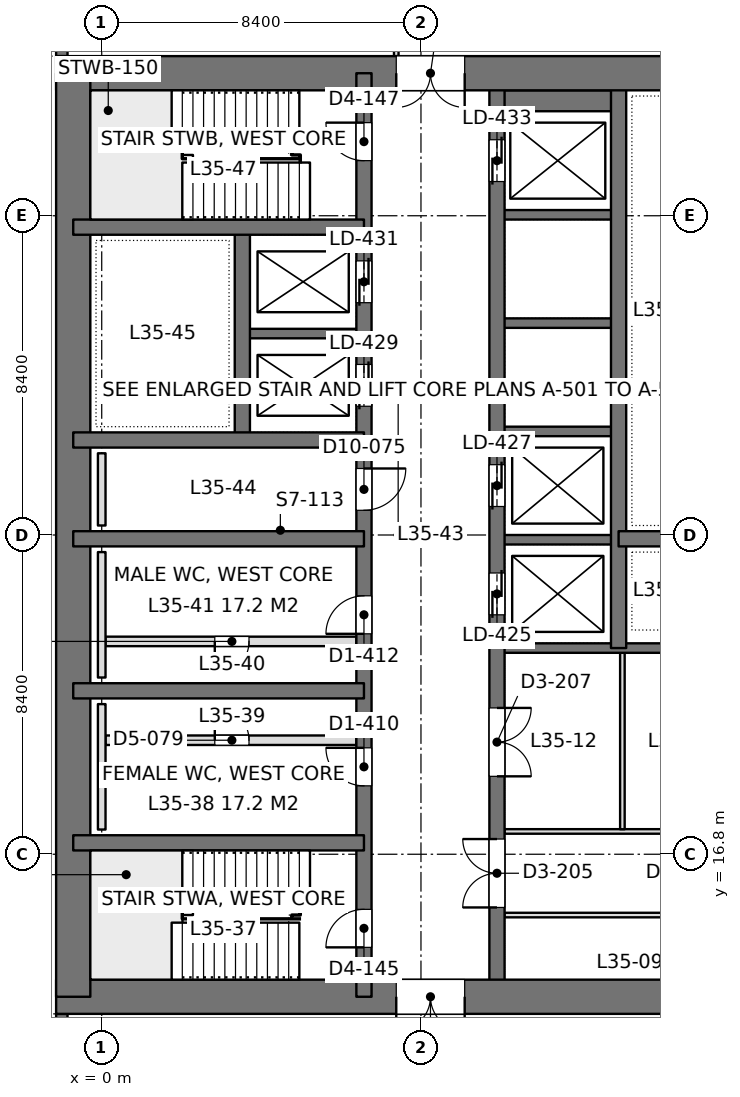
"""IFC4 building model, lengths in metres.
Left out: names, types, materials, properties, quantities, classifications, styles, units other than length and angle.
Written with IfcOpenShell. Run it as: python <this file> out.ifc"""

import sys

from ifc_helpers import new_model, si_unit, direction, frame, frame_2d, origin, place, context, subcontext, project, spatial, rectangle, extrude, element, fill, save


model = new_model("IFC4")
c1 = context("Model", 3, precision=1e-05, world=origin(), true_north=direction((0.0, 1.0)))
c2 = subcontext(c1, "Body", "Model", "MODEL_VIEW")
j1 = project(units=[si_unit("LENGTHUNIT", "METRE"), si_unit("PLANEANGLEUNIT", "RADIAN")], contexts=[c1])
p1 = place(None, origin())
s1 = spatial("IfcSite", under=j1, at=p1, CompositionType="ELEMENT")
p2 = place(p1, origin())
s2 = spatial("IfcBuilding", under=s1, at=p2, CompositionType="ELEMENT")
p3 = place(p2, frame((0.0, 0.0, 155.4)))
s3 = spatial("IfcBuildingStorey", under=s2, at=p3, CompositionType="ELEMENT", Elevation=155.4)
p4 = place(p3, frame((-1.2, 13.05, 0.0), z_axis=(0.0, 0.0, 1.0), x_axis=(1.0, 0.0, 0.0)))
e1 = element("IfcWall", 1, at=p4, inside=s3, PredefinedType="SHEAR", context=c2, shape_type="SweptSolid", body=[
    extrude(rectangle(XDim=18.0, YDim=0.9, at=frame_2d((9.0, 0.0))), origin(), (0.0, 0.0, 1.0), 4.2),
])
p5 = place(p4, frame((8.95, 0.0, 0.0)))
e2 = element("IfcOpeningElement", 2, at=p5, cuts=e1, PredefinedType="OPENING", context=c2, shape_type="SweptSolid", body=[
    extrude(rectangle(XDim=1.8, YDim=2.4, at=frame_2d((0.9, 1.2))), frame((0.0, 0.46, 0.0), z_axis=(0.0, -1.0, 0.0), x_axis=(1.0, 0.0, 0.0)), (0.0, 0.0, 1.0), 0.92),
])
p6 = place(p3, frame((-1.2, 37.35, 0.0), z_axis=(0.0, 0.0, 1.0), x_axis=(1.0, 0.0, 0.0)))
e3 = element("IfcWall", 3, at=p6, inside=s3, PredefinedType="SHEAR", context=c2, shape_type="SweptSolid", body=[
    extrude(rectangle(XDim=18.0, YDim=0.9, at=frame_2d((9.0, 0.0))), origin(), (0.0, 0.0, 1.0), 4.2),
])
p7 = place(p6, frame((8.95, 0.0, 0.0)))
e4 = element("IfcOpeningElement", 4, at=p7, cuts=e3, PredefinedType="OPENING", context=c2, shape_type="SweptSolid", body=[
    extrude(rectangle(XDim=1.8, YDim=2.4, at=frame_2d((0.9, 1.2))), frame((0.0, 0.46, 0.0), z_axis=(0.0, -1.0, 0.0), x_axis=(1.0, 0.0, 0.0)), (0.0, 0.0, 1.0), 0.92),
])
p8 = place(p3, frame((-0.75, 13.05, 0.0), z_axis=(0.0, 0.0, 1.0), x_axis=(0.0, 1.0, 0.0)))
e5 = element("IfcWall", 5, at=p8, inside=s3, PredefinedType="SHEAR", context=c2, shape_type="SweptSolid", body=[
    extrude(rectangle(XDim=24.3, YDim=0.9, at=frame_2d((12.15, 0.0))), origin(), (0.0, 0.0, 1.0), 4.2),
])
p9 = place(p3, frame((6.9, 13.05, 0.0), z_axis=(0.0, 0.0, 1.0), x_axis=(0.0, 1.0, 0.0)))
e6 = element("IfcWall", 6, at=p9, inside=s3, PredefinedType="SHEAR", context=c2, shape_type="SweptSolid", body=[
    extrude(rectangle(XDim=24.3, YDim=0.4, at=frame_2d((12.15, 0.0))), origin(), (0.0, 0.0, 1.0), 4.2),
])
p10 = place(p9, frame((1.3, 0.0, 0.0)))
e7 = element("IfcOpeningElement", 7, at=p10, cuts=e6, PredefinedType="OPENING", context=c2, shape_type="SweptSolid", body=[
    extrude(rectangle(XDim=1.0, YDim=2.2, at=frame_2d((0.5, 1.1))), frame((0.0, 0.21, 0.0), z_axis=(0.0, -1.0, 0.0), x_axis=(1.0, 0.0, 0.0)), (0.0, 0.0, 1.0), 0.42),
])
p11 = place(p9, frame((22.0, 0.0, 0.0)))
e8 = element("IfcOpeningElement", 8, at=p11, cuts=e6, PredefinedType="OPENING", context=c2, shape_type="SweptSolid", body=[
    extrude(rectangle(XDim=1.0, YDim=2.2, at=frame_2d((0.5, 1.1))), frame((0.0, 0.21, 0.0), z_axis=(0.0, -1.0, 0.0), x_axis=(1.0, 0.0, 0.0)), (0.0, 0.0, 1.0), 0.42),
])
p12 = place(p9, frame((5.55, 0.0, 0.0)))
e9 = element("IfcOpeningElement", 9, at=p12, cuts=e6, PredefinedType="OPENING", context=c2, shape_type="SweptSolid", body=[
    extrude(rectangle(XDim=1.0, YDim=2.2, at=frame_2d((0.5, 1.1))), frame((0.0, 0.21, 0.0), z_axis=(0.0, -1.0, 0.0), x_axis=(1.0, 0.0, 0.0)), (0.0, 0.0, 1.0), 0.42),
])
p13 = place(p9, frame((9.55, 0.0, 0.0)))
e10 = element("IfcOpeningElement", 10, at=p13, cuts=e6, PredefinedType="OPENING", context=c2, shape_type="SweptSolid", body=[
    extrude(rectangle(XDim=1.0, YDim=2.2, at=frame_2d((0.5, 1.1))), frame((0.0, 0.21, 0.0), z_axis=(0.0, -1.0, 0.0), x_axis=(1.0, 0.0, 0.0)), (0.0, 0.0, 1.0), 0.42),
])
p14 = place(p9, frame((12.8, 0.0, 0.0)))
e11 = element("IfcOpeningElement", 11, at=p14, cuts=e6, PredefinedType="OPENING", context=c2, shape_type="SweptSolid", body=[
    extrude(rectangle(XDim=1.1, YDim=2.2, at=frame_2d((0.55, 1.1))), frame((0.0, 0.21, 0.0), z_axis=(0.0, -1.0, 0.0), x_axis=(1.0, 0.0, 0.0)), (0.0, 0.0, 1.0), 0.42),
])
p15 = place(p9, frame((15.538, 0.0, 0.0)))
e12 = element("IfcOpeningElement", 12, at=p15, cuts=e6, PredefinedType="OPENING", context=c2, shape_type="SweptSolid", body=[
    extrude(rectangle(XDim=1.1, YDim=2.2, at=frame_2d((0.55, 1.1))), frame((0.0, 0.21, 0.0), z_axis=(0.0, -1.0, 0.0), x_axis=(1.0, 0.0, 0.0)), (0.0, 0.0, 1.0), 0.42),
])
p16 = place(p9, frame((18.262, 0.0, 0.0)))
e13 = element("IfcOpeningElement", 13, at=p16, cuts=e6, PredefinedType="OPENING", context=c2, shape_type="SweptSolid", body=[
    extrude(rectangle(XDim=1.1, YDim=2.2, at=frame_2d((0.55, 1.1))), frame((0.0, 0.21, 0.0), z_axis=(0.0, -1.0, 0.0), x_axis=(1.0, 0.0, 0.0)), (0.0, 0.0, 1.0), 0.42),
])
p17 = place(p3, frame((10.4, 13.05, 0.0), z_axis=(0.0, 0.0, 1.0), x_axis=(0.0, 1.0, 0.0)))
e14 = element("IfcWall", 14, at=p17, inside=s3, PredefinedType="SHEAR", context=c2, shape_type="SweptSolid", body=[
    extrude(rectangle(XDim=24.3, YDim=0.4, at=frame_2d((12.15, 0.0))), origin(), (0.0, 0.0, 1.0), 4.2),
])
p18 = place(p17, frame((10.05, 0.0, 0.0)))
e15 = element("IfcOpeningElement", 15, at=p18, cuts=e14, PredefinedType="OPENING", context=c2, shape_type="SweptSolid", body=[
    extrude(rectangle(XDim=1.1, YDim=2.2, at=frame_2d((0.55, 1.1))), frame((0.0, 0.21, 0.0), z_axis=(0.0, -1.0, 0.0), x_axis=(1.0, 0.0, 0.0)), (0.0, 0.0, 1.0), 0.42),
])
p19 = place(p17, frame((12.9, 0.0, 0.0)))
e16 = element("IfcOpeningElement", 16, at=p19, cuts=e14, PredefinedType="OPENING", context=c2, shape_type="SweptSolid", body=[
    extrude(rectangle(XDim=1.1, YDim=2.2, at=frame_2d((0.55, 1.1))), frame((0.0, 0.21, 0.0), z_axis=(0.0, -1.0, 0.0), x_axis=(1.0, 0.0, 0.0)), (0.0, 0.0, 1.0), 0.42),
])
p20 = place(p17, frame((21.45, 0.0, 0.0)))
e17 = element("IfcOpeningElement", 17, at=p20, cuts=e14, PredefinedType="OPENING", context=c2, shape_type="SweptSolid", body=[
    extrude(rectangle(XDim=1.1, YDim=2.2, at=frame_2d((0.55, 1.1))), frame((0.0, 0.21, 0.0), z_axis=(0.0, -1.0, 0.0), x_axis=(1.0, 0.0, 0.0)), (0.0, 0.0, 1.0), 0.42),
])
p21 = place(p17, frame((2.35, 0.0, 0.0)))
e18 = element("IfcOpeningElement", 18, at=p21, cuts=e14, PredefinedType="OPENING", context=c2, shape_type="SweptSolid", body=[
    extrude(rectangle(XDim=1.8, YDim=2.4, at=frame_2d((0.9, 1.2))), frame((0.0, 0.21, 0.0), z_axis=(0.0, -1.0, 0.0), x_axis=(1.0, 0.0, 0.0)), (0.0, 0.0, 1.0), 0.42),
])
p22 = place(p17, frame((5.8, 0.0, 0.0)))
e19 = element("IfcOpeningElement", 19, at=p22, cuts=e14, PredefinedType="OPENING", context=c2, shape_type="SweptSolid", body=[
    extrude(rectangle(XDim=1.8, YDim=2.4, at=frame_2d((0.9, 1.2))), frame((0.0, 0.21, 0.0), z_axis=(0.0, -1.0, 0.0), x_axis=(1.0, 0.0, 0.0)), (0.0, 0.0, 1.0), 0.42),
])
p23 = place(p3, frame((13.6, 22.225, 0.0), z_axis=(0.0, 0.0, 1.0), x_axis=(0.0, 1.0, 0.0)))
e20 = element("IfcWall", 20, at=p23, inside=s3, PredefinedType="SHEAR", context=c2, shape_type="SweptSolid", body=[
    extrude(rectangle(XDim=15.125, YDim=0.4, at=frame_2d((7.562, 0.0))), origin(), (0.0, 0.0, 1.0), 4.2),
])
for number, where, z_axis, x_axis in (
    (21, (-0.75, 17.1, 0.0), (0.0, 0.0, 1.0), (1.0, 0.0, 0.0)),
    (22, (-0.75, 21.1, 0.0), (0.0, 0.0, 1.0), (1.0, 0.0, 0.0)),
    (23, (-0.75, 25.1, 0.0), (0.0, 0.0, 1.0), (1.0, 0.0, 0.0)),
    (24, (-0.75, 27.7, 0.0), (0.0, 0.0, 1.0), (1.0, 0.0, 0.0)),
    (25, (-0.75, 33.3, 0.0), (0.0, 0.0, 1.0), (1.0, 0.0, 0.0)),
):
    element("IfcWall", number, at=place(p3, frame(where, z_axis=z_axis, x_axis=x_axis)), inside=s3, PredefinedType="SHEAR", context=c2, shape_type="SweptSolid", body=[
        extrude(rectangle(XDim=7.65, YDim=0.4, at=frame_2d((3.825, 0.0))), origin(), (0.0, 0.0, 1.0), 4.2),
    ])
p24 = place(p3, frame((3.7, 27.7, 0.0), z_axis=(0.0, 0.0, 1.0), x_axis=(0.0, 1.0, 0.0)))
e26 = element("IfcWall", 26, at=p24, inside=s3, PredefinedType="SHEAR", context=c2, shape_type="SweptSolid", body=[
    extrude(rectangle(XDim=5.6, YDim=0.4, at=frame_2d((2.8, 0.0))), origin(), (0.0, 0.0, 1.0), 4.2),
])
p25 = place(p3, frame((3.7, 30.5, 0.0), z_axis=(0.0, 0.0, 1.0), x_axis=(1.0, 0.0, 0.0)))
e27 = element("IfcWall", 27, at=p25, inside=s3, PredefinedType="SHEAR", context=c2, shape_type="SweptSolid", body=[
    extrude(rectangle(XDim=3.2, YDim=0.25, at=frame_2d((1.6, 0.0))), origin(), (0.0, 0.0, 1.0), 4.2),
])
p26 = place(p3, frame((13.6, 25.1, 0.0), z_axis=(0.0, 0.0, 1.0), x_axis=(1.0, 0.0, 0.0)))
e28 = element("IfcWall", 28, at=p26, inside=s3, PredefinedType="SHEAR", context=c2, shape_type="SweptSolid", body=[
    extrude(rectangle(XDim=2.75, YDim=0.4, at=frame_2d((1.375, 0.0))), origin(), (0.0, 0.0, 1.0), 4.2),
])
p27 = place(p3, frame((10.4, 22.225, 0.0), z_axis=(0.0, 0.0, 1.0), x_axis=(1.0, 0.0, 0.0)))
e29 = element("IfcWall", 29, at=p27, inside=s3, PredefinedType="SHEAR", context=c2, shape_type="SweptSolid", body=[
    extrude(rectangle(XDim=5.95, YDim=0.25, at=frame_2d((2.975, 0.0))), origin(), (0.0, 0.0, 1.0), 4.2),
])
for number, where, z_axis, x_axis in (
    (30, (10.4, 25.075, 0.0), (0.0, 0.0, 1.0), (1.0, 0.0, 0.0)),
    (31, (10.4, 27.925, 0.0), (0.0, 0.0, 1.0), (1.0, 0.0, 0.0)),
    (32, (10.4, 30.775, 0.0), (0.0, 0.0, 1.0), (1.0, 0.0, 0.0)),
    (33, (10.4, 33.625, 0.0), (0.0, 0.0, 1.0), (1.0, 0.0, 0.0)),
):
    element("IfcWall", number, at=place(p3, frame(where, z_axis=z_axis, x_axis=x_axis)), inside=s3, PredefinedType="SHEAR", context=c2, shape_type="SweptSolid", body=[
        extrude(rectangle(XDim=3.2, YDim=0.25, at=frame_2d((1.6, 0.0))), origin(), (0.0, 0.0, 1.0), 4.2),
    ])
p28 = place(p3, frame((10.4, 36.625, 0.0), z_axis=(0.0, 0.0, 1.0), x_axis=(1.0, 0.0, 0.0)))
e34 = element("IfcWall", 34, at=p28, inside=s3, PredefinedType="SHEAR", context=c2, shape_type="SweptSolid", body=[
    extrude(rectangle(XDim=3.2, YDim=0.55, at=frame_2d((1.6, 0.0))), origin(), (0.0, 0.0, 1.0), 4.2),
])
p29 = place(p3, frame((-1.05, 8.4, 0.0), z_axis=(0.0, 0.0, 1.0), x_axis=(0.0, 1.0, 0.0)))
e35 = element("IfcWall", 35, at=p29, inside=s3, PredefinedType="SOLIDWALL", context=c2, shape_type="SweptSolid", body=[
    extrude(rectangle(XDim=4.2, YDim=0.3, at=frame_2d((2.1, 0.0))), origin(), (0.0, 0.0, 1.0), 4.05),
])
p30 = place(p29, frame((0.9, 0.0, 0.9)))
e36 = element("IfcOpeningElement", 36, at=p30, cuts=e35, PredefinedType="OPENING", context=c2, shape_type="SweptSolid", body=[
    extrude(rectangle(XDim=2.4, YDim=1.9, at=frame_2d((1.2, 0.95))), frame((0.0, 0.16, 0.0), z_axis=(0.0, -1.0, 0.0), x_axis=(1.0, 0.0, 0.0)), (0.0, 0.0, 1.0), 0.32),
])
p31 = place(p3, frame((-1.05, 37.8, 0.0), z_axis=(0.0, 0.0, 1.0), x_axis=(0.0, 1.0, 0.0)))
e37 = element("IfcWall", 37, at=p31, inside=s3, PredefinedType="SOLIDWALL", context=c2, shape_type="SweptSolid", body=[
    extrude(rectangle(XDim=4.2, YDim=0.3, at=frame_2d((2.1, 0.0))), origin(), (0.0, 0.0, 1.0), 4.05),
])
p32 = place(p31, frame((0.9, 0.0, 0.9)))
e38 = element("IfcOpeningElement", 38, at=p32, cuts=e37, PredefinedType="OPENING", context=c2, shape_type="SweptSolid", body=[
    extrude(rectangle(XDim=2.4, YDim=1.9, at=frame_2d((1.2, 0.95))), frame((0.0, 0.16, 0.0), z_axis=(0.0, -1.0, 0.0), x_axis=(1.0, 0.0, 0.0)), (0.0, 0.0, 1.0), 0.32),
])
p33 = place(p3, frame((10.598, 17.4, 0.0), z_axis=(0.0, 0.0, 1.0), x_axis=(1.0, 0.0, 0.0)))
e39 = element("IfcWall", 39, at=p33, inside=s3, PredefinedType="PARTITIONING", context=c2, shape_type="SweptSolid", body=[
    extrude(rectangle(XDim=5.904, YDim=0.12, at=frame_2d((2.952, 0.0))), origin(), (0.0, 0.0, 1.0), 3.55),
])
p34 = place(p33, frame((4.152, 0.0, 0.0)))
e40 = element("IfcOpeningElement", 40, at=p34, cuts=e39, PredefinedType="OPENING", context=c2, shape_type="SweptSolid", body=[
    extrude(rectangle(XDim=1.0, YDim=2.4, at=frame_2d((0.5, 1.2))), frame((0.0, 0.07, 0.0), z_axis=(0.0, -1.0, 0.0), x_axis=(1.0, 0.0, 0.0)), (0.0, 0.0, 1.0), 0.14),
])
p35 = place(p3, frame((13.7, 17.458, 0.0), z_axis=(0.0, 0.0, 1.0), x_axis=(0.0, 1.0, 0.0)))
e41 = element("IfcWall", 41, at=p35, inside=s3, PredefinedType="PARTITIONING", context=c2, shape_type="SweptSolid", body=[
    extrude(rectangle(XDim=4.644, YDim=0.12, at=frame_2d((2.322, 0.0))), origin(), (0.0, 0.0, 1.0), 3.6),
])
p36 = place(p3, frame((10.598, 15.2, 0.0), z_axis=(0.0, 0.0, 1.0), x_axis=(1.0, 0.0, 0.0)))
e42 = element("IfcWall", 42, at=p36, inside=s3, PredefinedType="PARTITIONING", context=c2, shape_type="SweptSolid", body=[
    extrude(rectangle(XDim=6.204, YDim=0.12, at=frame_2d((3.102, 0.0))), origin(), (0.0, 0.0, 1.0), 3.55),
])
p37 = place(p3, frame((7.75, 37.8, 0.0), z_axis=(0.0, 0.0, 1.0), x_axis=(0.0, 1.0, 0.0)))
e43 = element("IfcWall", 43, at=p37, inside=s3, PredefinedType="PARTITIONING", context=c2, shape_type="SweptSolid", body=[
    extrude(rectangle(XDim=2.0, YDim=0.12, at=frame_2d((1.0, 0.0))), origin(), (0.0, 0.0, 1.0), 4.05),
])
p38 = place(p3, frame((0.1, 22.4, 0.0), z_axis=(0.0, 0.0, 1.0), x_axis=(1.0, 0.0, 0.0)))
e44 = element("IfcWall", 44, at=p38, inside=s3, PredefinedType="PARTITIONING", context=c2, shape_type="SweptSolid", body=[
    extrude(rectangle(XDim=6.6, YDim=0.25, at=frame_2d((3.3, 0.0))), origin(), (0.0, 0.0, 1.0), 4.0),
])
p39 = place(p38, frame((2.875, 0.0, 0.0)))
e45 = element("IfcOpeningElement", 45, at=p39, cuts=e44, PredefinedType="OPENING", context=c2, shape_type="SweptSolid", body=[
    extrude(rectangle(XDim=0.9, YDim=2.2, at=frame_2d((0.45, 1.1))), frame((0.0, 0.135, 0.0), z_axis=(0.0, -1.0, 0.0), x_axis=(1.0, 0.0, 0.0)), (0.0, 0.0, 1.0), 0.27),
])
p40 = place(p3, frame((0.1, 19.8, 0.0), z_axis=(0.0, 0.0, 1.0), x_axis=(1.0, 0.0, 0.0)))
e46 = element("IfcWall", 46, at=p40, inside=s3, PredefinedType="PARTITIONING", context=c2, shape_type="SweptSolid", body=[
    extrude(rectangle(XDim=6.6, YDim=0.25, at=frame_2d((3.3, 0.0))), origin(), (0.0, 0.0, 1.0), 4.0),
])
p41 = place(p40, frame((2.875, 0.0, 0.0)))
e47 = element("IfcOpeningElement", 47, at=p41, cuts=e46, PredefinedType="OPENING", context=c2, shape_type="SweptSolid", body=[
    extrude(rectangle(XDim=0.9, YDim=2.2, at=frame_2d((0.45, 1.1))), frame((0.0, 0.135, 0.0), z_axis=(0.0, -1.0, 0.0), x_axis=(1.0, 0.0, 0.0)), (0.0, 0.0, 1.0), 0.27),
])
for number, where, z_axis, x_axis in (
    (48, (0.0, 17.45, 0.0), (0.0, 0.0, 1.0), (0.0, 1.0, 0.0)),
    (49, (0.0, 21.45, 0.0), (0.0, 0.0, 1.0), (0.0, 1.0, 0.0)),
):
    element("IfcWall", number, at=place(p3, frame(where, z_axis=z_axis, x_axis=x_axis)), inside=s3, PredefinedType="PLUMBINGWALL", context=c2, shape_type="SweptSolid", body=[
        extrude(rectangle(XDim=3.3, YDim=0.2, at=frame_2d((1.65, 0.0))), origin(), (0.0, 0.0, 1.0), 1.2),
    ])
p42 = place(p3, frame((0.0, 25.45, 0.0), z_axis=(0.0, 0.0, 1.0), x_axis=(0.0, 1.0, 0.0)))
e50 = element("IfcWall", 50, at=p42, inside=s3, PredefinedType="PLUMBINGWALL", context=c2, shape_type="SweptSolid", body=[
    extrude(rectangle(XDim=1.9, YDim=0.2, at=frame_2d((0.95, 0.0))), origin(), (0.0, 0.0, 1.0), 1.2),
])
p43 = place(p5, frame((1.8, 0.0, 0.0), z_axis=(0.0, 0.0, 1.0), x_axis=(-1.0, 0.0, 0.0)))
e51 = element("IfcDoor", 51, at=p43, inside=s3, OperationType="DOUBLE_DOOR_SINGLE_SWING", PredefinedType="DOOR", context=c2, shape_type="SweptSolid", body=[
    extrude(rectangle(XDim=1.8, YDim=2.4, at=frame_2d((0.9, 1.2))), frame((0.0, 0.025, 0.0), z_axis=(0.0, -1.0, 0.0), x_axis=(1.0, 0.0, 0.0)), (0.0, 0.0, 1.0), 0.05),
])
fill(e2, e51)
p44 = place(p7, frame((1.8, 0.0, 0.0), z_axis=(0.0, 0.0, 1.0), x_axis=(-1.0, 0.0, 0.0)))
e52 = element("IfcDoor", 52, at=p44, inside=s3, OperationType="DOUBLE_DOOR_SINGLE_SWING", PredefinedType="DOOR", context=c2, shape_type="SweptSolid", body=[
    extrude(rectangle(XDim=1.8, YDim=2.4, at=frame_2d((0.9, 1.2))), frame((0.0, 0.025, 0.0), z_axis=(0.0, -1.0, 0.0), x_axis=(1.0, 0.0, 0.0)), (0.0, 0.0, 1.0), 0.05),
])
fill(e4, e52)
p45 = place(p10, origin())
e53 = element("IfcDoor", 53, at=p45, inside=s3, OperationType="SINGLE_SWING_LEFT", PredefinedType="DOOR", context=c2, shape_type="SweptSolid", body=[
    extrude(rectangle(XDim=1.0, YDim=2.2, at=frame_2d((0.5, 1.1))), frame((0.0, 0.025, 0.0), z_axis=(0.0, -1.0, 0.0), x_axis=(1.0, 0.0, 0.0)), (0.0, 0.0, 1.0), 0.05),
])
fill(e7, e53)
p46 = place(p11, origin())
e54 = element("IfcDoor", 54, at=p46, inside=s3, OperationType="SINGLE_SWING_RIGHT", PredefinedType="DOOR", context=c2, shape_type="SweptSolid", body=[
    extrude(rectangle(XDim=1.0, YDim=2.2, at=frame_2d((0.5, 1.1))), frame((0.0, 0.025, 0.0), z_axis=(0.0, -1.0, 0.0), x_axis=(1.0, 0.0, 0.0)), (0.0, 0.0, 1.0), 0.05),
])
fill(e8, e54)
p47 = place(p12, origin())
e55 = element("IfcDoor", 55, at=p47, inside=s3, OperationType="SINGLE_SWING_RIGHT", PredefinedType="DOOR", context=c2, shape_type="SweptSolid", body=[
    extrude(rectangle(XDim=1.0, YDim=2.2, at=frame_2d((0.5, 1.1))), frame((0.0, 0.025, 0.0), z_axis=(0.0, -1.0, 0.0), x_axis=(1.0, 0.0, 0.0)), (0.0, 0.0, 1.0), 0.05),
])
fill(e9, e55)
p48 = place(p13, origin())
e56 = element("IfcDoor", 56, at=p48, inside=s3, OperationType="SINGLE_SWING_LEFT", PredefinedType="DOOR", context=c2, shape_type="SweptSolid", body=[
    extrude(rectangle(XDim=1.0, YDim=2.2, at=frame_2d((0.5, 1.1))), frame((0.0, 0.025, 0.0), z_axis=(0.0, -1.0, 0.0), x_axis=(1.0, 0.0, 0.0)), (0.0, 0.0, 1.0), 0.05),
])
fill(e10, e56)
p49 = place(p14, frame((1.1, 0.0, 0.0), z_axis=(0.0, 0.0, 1.0), x_axis=(-1.0, 0.0, 0.0)))
e57 = element("IfcDoor", 57, at=p49, inside=s3, OperationType="SINGLE_SWING_LEFT", PredefinedType="DOOR", context=c2, shape_type="SweptSolid", body=[
    extrude(rectangle(XDim=1.1, YDim=2.2, at=frame_2d((0.55, 1.1))), frame((0.0, 0.025, 0.0), z_axis=(0.0, -1.0, 0.0), x_axis=(1.0, 0.0, 0.0)), (0.0, 0.0, 1.0), 0.05),
])
fill(e11, e57)
p50 = place(p18, origin())
e58 = element("IfcDoor", 58, at=p50, inside=s3, OperationType="DOUBLE_DOOR_SLIDING", PredefinedType="DOOR", context=c2, shape_type="SweptSolid", body=[
    extrude(rectangle(XDim=1.1, YDim=2.2, at=frame_2d((0.55, 1.1))), frame((0.0, 0.025, 0.0), z_axis=(0.0, -1.0, 0.0), x_axis=(1.0, 0.0, 0.0)), (0.0, 0.0, 1.0), 0.05),
])
fill(e15, e58)
p51 = place(p19, origin())
e59 = element("IfcDoor", 59, at=p51, inside=s3, OperationType="DOUBLE_DOOR_SLIDING", PredefinedType="DOOR", context=c2, shape_type="SweptSolid", body=[
    extrude(rectangle(XDim=1.1, YDim=2.2, at=frame_2d((0.55, 1.1))), frame((0.0, 0.025, 0.0), z_axis=(0.0, -1.0, 0.0), x_axis=(1.0, 0.0, 0.0)), (0.0, 0.0, 1.0), 0.05),
])
fill(e16, e59)
p52 = place(p20, origin())
e60 = element("IfcDoor", 60, at=p52, inside=s3, OperationType="DOUBLE_DOOR_SLIDING", PredefinedType="DOOR", context=c2, shape_type="SweptSolid", body=[
    extrude(rectangle(XDim=1.1, YDim=2.2, at=frame_2d((0.55, 1.1))), frame((0.0, 0.025, 0.0), z_axis=(0.0, -1.0, 0.0), x_axis=(1.0, 0.0, 0.0)), (0.0, 0.0, 1.0), 0.05),
])
fill(e17, e60)
p53 = place(p15, origin())
e61 = element("IfcDoor", 61, at=p53, inside=s3, OperationType="DOUBLE_DOOR_SLIDING", PredefinedType="DOOR", context=c2, shape_type="SweptSolid", body=[
    extrude(rectangle(XDim=1.1, YDim=2.2, at=frame_2d((0.55, 1.1))), frame((0.0, 0.025, 0.0), z_axis=(0.0, -1.0, 0.0), x_axis=(1.0, 0.0, 0.0)), (0.0, 0.0, 1.0), 0.05),
])
fill(e12, e61)
p54 = place(p16, origin())
e62 = element("IfcDoor", 62, at=p54, inside=s3, OperationType="DOUBLE_DOOR_SLIDING", PredefinedType="DOOR", context=c2, shape_type="SweptSolid", body=[
    extrude(rectangle(XDim=1.1, YDim=2.2, at=frame_2d((0.55, 1.1))), frame((0.0, 0.025, 0.0), z_axis=(0.0, -1.0, 0.0), x_axis=(1.0, 0.0, 0.0)), (0.0, 0.0, 1.0), 0.05),
])
fill(e13, e62)
p55 = place(p21, origin())
e63 = element("IfcDoor", 63, at=p55, inside=s3, OperationType="DOUBLE_DOOR_SINGLE_SWING", PredefinedType="DOOR", context=c2, shape_type="SweptSolid", body=[
    extrude(rectangle(XDim=1.8, YDim=2.4, at=frame_2d((0.9, 1.2))), frame((0.0, 0.025, 0.0), z_axis=(0.0, -1.0, 0.0), x_axis=(1.0, 0.0, 0.0)), (0.0, 0.0, 1.0), 0.05),
])
fill(e18, e63)
p56 = place(p22, frame((1.8, 0.0, 0.0), z_axis=(0.0, 0.0, 1.0), x_axis=(-1.0, 0.0, 0.0)))
e64 = element("IfcDoor", 64, at=p56, inside=s3, OperationType="DOUBLE_DOOR_SINGLE_SWING", PredefinedType="DOOR", context=c2, shape_type="SweptSolid", body=[
    extrude(rectangle(XDim=1.8, YDim=2.4, at=frame_2d((0.9, 1.2))), frame((0.0, 0.025, 0.0), z_axis=(0.0, -1.0, 0.0), x_axis=(1.0, 0.0, 0.0)), (0.0, 0.0, 1.0), 0.05),
])
fill(e19, e64)
p57 = place(p39, frame((0.9, 0.0, 0.0), z_axis=(0.0, 0.0, 1.0), x_axis=(-1.0, 0.0, 0.0)))
e65 = element("IfcDoor", 65, at=p57, inside=s3, OperationType="SINGLE_SWING_RIGHT", PredefinedType="DOOR", context=c2, shape_type="SweptSolid", body=[
    extrude(rectangle(XDim=0.9, YDim=2.2, at=frame_2d((0.45, 1.1))), frame((0.0, 0.025, 0.0), z_axis=(0.0, -1.0, 0.0), x_axis=(1.0, 0.0, 0.0)), (0.0, 0.0, 1.0), 0.05),
])
fill(e45, e65)
p58 = place(p41, origin())
e66 = element("IfcDoor", 66, at=p58, inside=s3, OperationType="SINGLE_SWING_LEFT", PredefinedType="DOOR", context=c2, shape_type="SweptSolid", body=[
    extrude(rectangle(XDim=0.9, YDim=2.2, at=frame_2d((0.45, 1.1))), frame((0.0, 0.025, 0.0), z_axis=(0.0, -1.0, 0.0), x_axis=(1.0, 0.0, 0.0)), (0.0, 0.0, 1.0), 0.05),
])
fill(e47, e66)
save(model, sys.argv[1])
